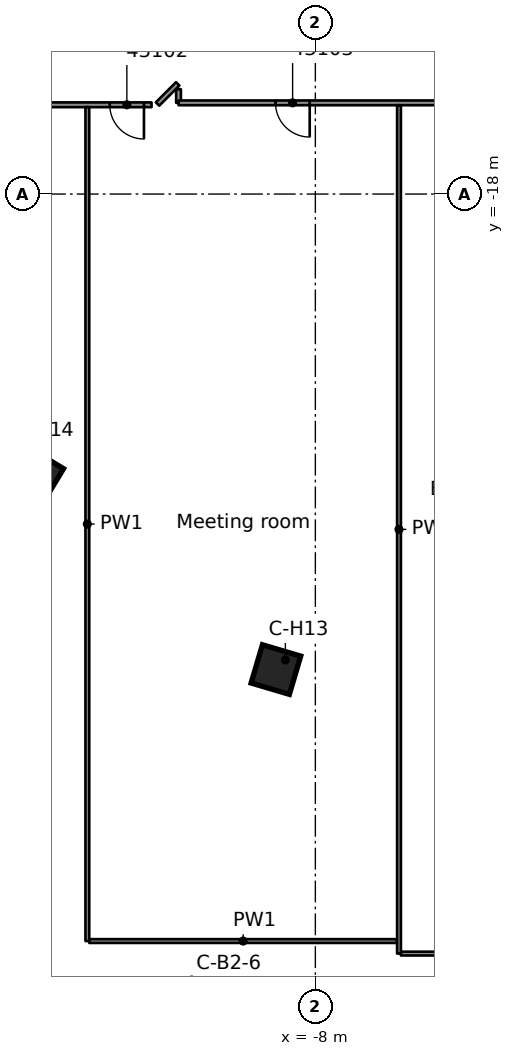
"""IFC4 building model, lengths in metres.
Left out: names, types, materials, properties, quantities, classifications, styles, units other than length and angle.
Written with IfcOpenShell. Run it as: python <this file> out.ifc"""

import sys

from ifc_helpers import new_model, si_unit, direction, frame, frame_2d, origin, origin_2d, place, context, subcontext, project, spatial, rectangle, extrude, element, fill, save


model = new_model("IFC4")
c1 = context("Model", 3, precision=1e-05, world=origin(), true_north=direction((0.0, 1.0)))
c2 = subcontext(c1, "Body", "Model", "MODEL_VIEW")
j1 = project(units=[si_unit("LENGTHUNIT", "METRE"), si_unit("PLANEANGLEUNIT", "RADIAN")], contexts=[c1])
p1 = place(None, origin())
s1 = spatial("IfcSite", under=j1, at=p1, CompositionType="ELEMENT")
p2 = place(p1, origin())
s2 = spatial("IfcBuilding", under=s1, at=p2, CompositionType="ELEMENT")
p3 = place(p2, frame((0.0, 0.0, 214.0)))
s3 = spatial("IfcBuildingStorey", under=s2, at=p3, CompositionType="ELEMENT", Elevation=214.0)
for number, where, z_axis, x_axis in (
    (1, (-9.038, -30.512, 0.0), (0.0, 0.0, 1.0), (-0.284, -0.959, 0.0)),
    (2, (-15.347, -25.403, 0.0), (0.0, 0.0, 1.0), (-0.517, -0.856, 0.0)),
):
    element("IfcColumn", number, at=place(p3, frame(where, z_axis=z_axis, x_axis=x_axis)), inside=s3, PredefinedType="COLUMN", context=c2, shape_type="SweptSolid", body=[
        extrude(rectangle(XDim=1.05, YDim=1.05, at=origin_2d()), origin(), (0.0, 0.0, 1.0), 3.5),
    ])
p4 = place(p3, frame((-11.601, -15.242, 0.0), z_axis=(0.0, 0.0, 1.0), x_axis=(0.002726642898, -0.999996282702, 0.0)))
e3 = element("IfcWall", 3, at=p4, inside=s3, PredefinedType="PARTITIONING", context=c2, shape_type="SweptSolid", body=[
    extrude(rectangle(XDim=0.358, YDim=0.125, at=frame_2d((0.179, 0.0))), origin(), (0.0, 0.0, 1.0), 3.06),
])
p5 = place(p3, frame((-5.749, -37.985, 0.0), z_axis=(0.0, 0.0, 1.0), x_axis=(1.0, 0.0, 0.0)))
e4 = element("IfcWall", 4, at=p5, inside=s3, PredefinedType="PARTITIONING", context=c2, shape_type="SweptSolid", body=[
    extrude(rectangle(XDim=5.699, YDim=0.1, at=frame_2d((2.85, 0.0))), origin(), (0.0, 0.0, 1.0), 3.06),
])
p6 = place(p3, frame((-13.95, -37.655, 0.0), z_axis=(0.0, 0.0, 1.0), x_axis=(1.0, 0.0, 0.0)))
e5 = element("IfcWall", 5, at=p6, inside=s3, PredefinedType="PARTITIONING", context=c2, shape_type="SweptSolid", body=[
    extrude(rectangle(XDim=8.101, YDim=0.1, at=frame_2d((4.05, 0.0))), origin(), (0.0, 0.0, 1.0), 3.06),
])
p7 = place(p3, frame((-12.311, -15.651, 0.0), z_axis=(0.0, 0.0, 1.0), x_axis=(-1.0, 0.0, 0.0)))
e6 = element("IfcWall", 6, at=p7, inside=s3, PredefinedType="PARTITIONING", context=c2, shape_type="SweptSolid", body=[
    extrude(rectangle(XDim=10.276, YDim=0.125, at=frame_2d((5.138, 0.0))), origin(), (0.0, 0.0, 1.0), 3.06),
])
p8 = place(p7, frame((5.039, 0.0, 0.0)))
e7 = element("IfcOpeningElement", 7, at=p8, cuts=e6, PredefinedType="OPENING", context=c2, shape_type="SweptSolid", body=[
    extrude(rectangle(XDim=1.8, YDim=2.1, at=frame_2d((0.9, 1.05))), frame((0.0, 0.073, 0.0), z_axis=(0.0, -1.0, 0.0), x_axis=(1.0, 0.0, 0.0)), (0.0, 0.0, 1.0), 0.145),
])
p9 = place(p7, frame((0.199, 0.0, 0.0)))
e8 = element("IfcOpeningElement", 8, at=p9, cuts=e6, PredefinedType="OPENING", context=c2, shape_type="SweptSolid", body=[
    extrude(rectangle(XDim=0.9, YDim=2.1, at=frame_2d((0.45, 1.05))), frame((0.0, 0.073, 0.0), z_axis=(0.0, -1.0, 0.0), x_axis=(1.0, 0.0, 0.0)), (0.0, 0.0, 1.0), 0.145),
])
p10 = place(p3, frame((11.539, -15.6, 0.0), z_axis=(0.0, 0.0, 1.0), x_axis=(-1.0, 0.0, 0.0)))
e9 = element("IfcWall", 9, at=p10, inside=s3, PredefinedType="PARTITIONING", context=c2, shape_type="SweptSolid", body=[
    extrude(rectangle(XDim=23.139, YDim=0.125, at=frame_2d((11.57, 0.0))), origin(), (0.0, 0.0, 1.0), 3.06),
])
p11 = place(p10, frame((19.688, 0.0, 0.0)))
e10 = element("IfcOpeningElement", 10, at=p11, cuts=e9, PredefinedType="OPENING", context=c2, shape_type="SweptSolid", body=[
    extrude(rectangle(XDim=0.9, YDim=2.1, at=frame_2d((0.45, 1.05))), frame((0.0, 0.073, 0.0), z_axis=(0.0, -1.0, 0.0), x_axis=(1.0, 0.0, 0.0)), (0.0, 0.0, 1.0), 0.145),
])
p12 = place(p10, frame((13.638, 0.0, 0.0)))
e11 = element("IfcOpeningElement", 11, at=p12, cuts=e9, PredefinedType="OPENING", context=c2, shape_type="SweptSolid", body=[
    extrude(rectangle(XDim=1.8, YDim=2.1, at=frame_2d((0.9, 1.05))), frame((0.0, 0.073, 0.0), z_axis=(0.0, -1.0, 0.0), x_axis=(1.0, 0.0, 0.0)), (0.0, 0.0, 1.0), 0.145),
])
p13 = place(p10, frame((7.838, 0.0, 0.0)))
e12 = element("IfcOpeningElement", 12, at=p13, cuts=e9, PredefinedType="OPENING", context=c2, shape_type="SweptSolid", body=[
    extrude(rectangle(XDim=1.8, YDim=2.1, at=frame_2d((0.9, 1.05))), frame((0.0, 0.073, 0.0), z_axis=(0.0, -1.0, 0.0), x_axis=(1.0, 0.0, 0.0)), (0.0, 0.0, 1.0), 0.145),
])
p14 = place(p10, frame((2.038, 0.0, 0.0)))
e13 = element("IfcOpeningElement", 13, at=p14, cuts=e9, PredefinedType="OPENING", context=c2, shape_type="SweptSolid", body=[
    extrude(rectangle(XDim=1.8, YDim=2.1, at=frame_2d((0.9, 1.05))), frame((0.0, 0.073, 0.0), z_axis=(0.0, -1.0, 0.0), x_axis=(1.0, 0.0, 0.0)), (0.0, 0.0, 1.0), 0.145),
])
p15 = place(p3, frame((-12.153, -15.631, 0.0), z_axis=(0.0, 0.0, 1.0), x_axis=(0.707106781187, 0.707106781187, 0.0)))
e14 = element("IfcWall", 14, at=p15, inside=s3, PredefinedType="PARTITIONING", context=c2, shape_type="SweptSolid", body=[
    extrude(rectangle(XDim=0.751, YDim=0.125, at=frame_2d((0.375, 0.0))), origin(), (0.0, 0.0, 1.0), 3.06),
])
p16 = place(p3, frame((-5.799, -37.985, 0.0), z_axis=(0.0, 0.0, 1.0), x_axis=(0.0, 1.0, 0.0)))
e15 = element("IfcWall", 15, at=p16, inside=s3, PredefinedType="PARTITIONING", context=c2, shape_type="SweptSolid", body=[
    extrude(rectangle(XDim=22.323, YDim=0.1, at=frame_2d((11.162, 0.0))), origin(), (0.0, 0.0, 1.0), 3.06),
])
p17 = place(p3, frame((-14.0, -37.655, 0.0), z_axis=(0.0, 0.0, 1.0), x_axis=(0.0, 1.0, 0.0)))
e16 = element("IfcWall", 16, at=p17, inside=s3, PredefinedType="PARTITIONING", context=c2, shape_type="SweptSolid", body=[
    extrude(rectangle(XDim=21.942, YDim=0.1, at=frame_2d((10.971, 0.0))), origin(), (0.0, 0.0, 1.0), 3.06),
])
p18 = place(p9, origin())
e17 = element("IfcDoor", 17, at=p18, inside=s3, OperationType="SINGLE_SWING_LEFT", PredefinedType="DOOR", context=c2, shape_type="SweptSolid", body=[
    extrude(rectangle(XDim=0.9, YDim=2.1, at=frame_2d((0.45, 1.05))), frame((0.0, 0.025, 0.0), z_axis=(0.0, -1.0, 0.0), x_axis=(1.0, 0.0, 0.0)), (0.0, 0.0, 1.0), 0.05),
])
fill(e8, e17)
p19 = place(p11, origin())
e18 = element("IfcDoor", 18, at=p19, inside=s3, OperationType="SINGLE_SWING_RIGHT", PredefinedType="DOOR", context=c2, shape_type="SweptSolid", body=[
    extrude(rectangle(XDim=0.9, YDim=2.1, at=frame_2d((0.45, 1.05))), frame((0.0, 0.025, 0.0), z_axis=(0.0, -1.0, 0.0), x_axis=(1.0, 0.0, 0.0)), (0.0, 0.0, 1.0), 0.05),
])
fill(e10, e18)
save(model, sys.argv[1])
